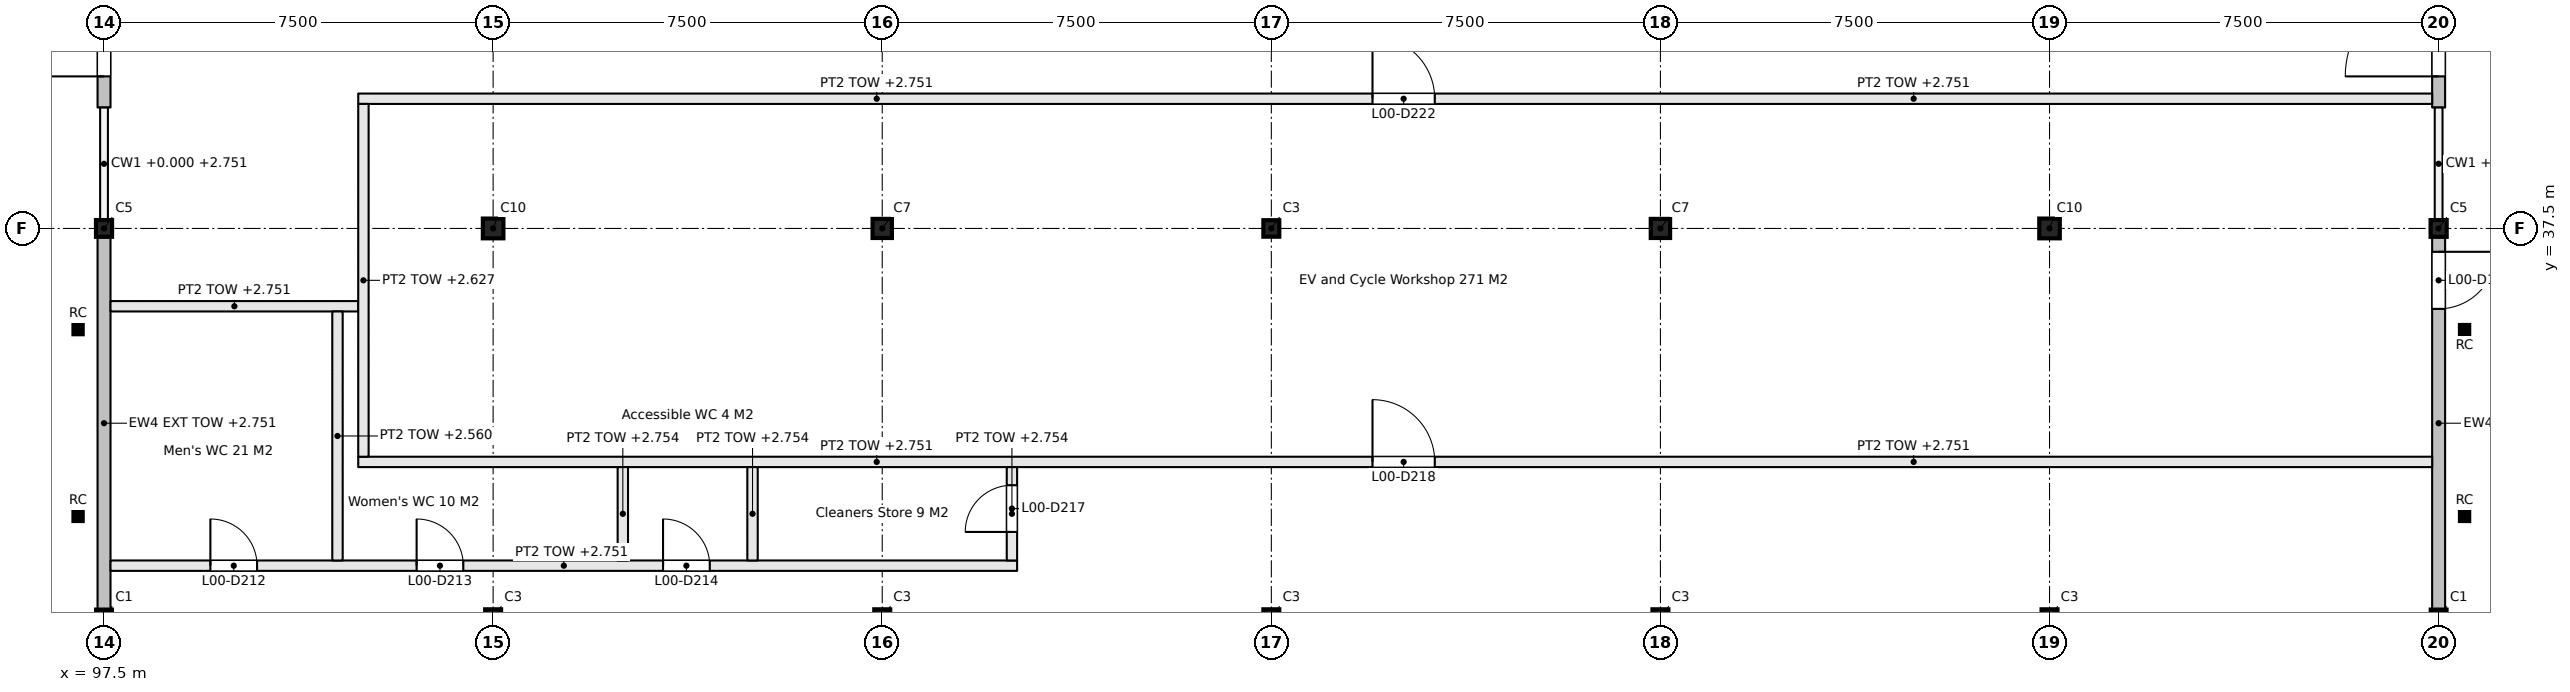
"""IFC4 building model, lengths in metres.
Left out: names, types, materials, properties, quantities, classifications, styles, units other than length and angle.
Written with IfcOpenShell. Run it as: python <this file> out.ifc"""

import sys

from ifc_helpers import new_model, si_unit, direction, frame, frame_2d, origin, origin_2d, place, context, subcontext, project, spatial, rectangle, hollow_rectangle, i_section, extrude, element, fill, save


model = new_model("IFC4")
c1 = context("Model", 3, precision=1e-05, world=origin(), true_north=direction((0.0, 1.0)))
c2 = subcontext(c1, "Body", "Model", "MODEL_VIEW")
j1 = project(units=[si_unit("LENGTHUNIT", "METRE"), si_unit("PLANEANGLEUNIT", "RADIAN")], contexts=[c1])
p1 = place(None, origin())
s1 = spatial("IfcSite", under=j1, at=p1, CompositionType="ELEMENT")
p2 = place(p1, origin())
s2 = spatial("IfcBuilding", under=s1, at=p2, CompositionType="ELEMENT")
p3 = place(p2, origin())
s3 = spatial("IfcBuildingStorey", under=s2, at=p3, CompositionType="ELEMENT", Elevation=0.0)
p4 = place(p3, frame((97.5, 30.0, -0.25), z_axis=(0.0, 0.0, 1.0), x_axis=(1.0, 0.0, 0.0)))
e1 = element("IfcColumn", 1, at=p4, inside=s3, PredefinedType="COLUMN", context=c2, shape_type="SweptSolid", body=[
    extrude(i_section(OverallWidth=0.305, OverallDepth=0.307, WebThickness=0.01, FlangeThickness=0.015, FilletRadius=0.015, at=origin_2d()), origin(), (0.0, 0.0, 1.0), 3.55),
])
p5 = place(p3, frame((97.5, 37.5, -0.25), z_axis=(0.0, 0.0, 1.0), x_axis=(1.0, 0.0, 0.0)))
e2 = element("IfcColumn", 2, at=p5, inside=s3, PredefinedType="COLUMN", context=c2, shape_type="SweptSolid", body=[
    extrude(i_section(OverallWidth=0.31, OverallDepth=0.323, WebThickness=0.014, FlangeThickness=0.023, FilletRadius=0.015, at=origin_2d()), origin(), (0.0, 0.0, 1.0), 3.55),
])
p6 = place(p3, frame((105.0, 30.0, -0.25), z_axis=(0.0, 0.0, 1.0), x_axis=(1.0, 0.0, 0.0)))
e3 = element("IfcColumn", 3, at=p6, inside=s3, PredefinedType="COLUMN", context=c2, shape_type="SweptSolid", body=[
    extrude(i_section(OverallWidth=0.307, OverallDepth=0.318, WebThickness=0.013, FlangeThickness=0.021, FilletRadius=0.015, at=origin_2d()), origin(), (0.0, 0.0, 1.0), 3.55),
])
p7 = place(p3, frame((105.0, 37.5, -0.25), z_axis=(0.0, 0.0, 1.0), x_axis=(1.0, 0.0, 0.0)))
e4 = element("IfcColumn", 4, at=p7, inside=s3, PredefinedType="COLUMN", context=c2, shape_type="SweptSolid", body=[
    extrude(i_section(OverallWidth=0.396, OverallDepth=0.381, WebThickness=0.019, FlangeThickness=0.03, FilletRadius=0.015, at=origin_2d()), origin(), (0.0, 0.0, 1.0), 3.55),
])
p8 = place(p3, frame((112.5, 30.0, -0.25), z_axis=(0.0, 0.0, 1.0), x_axis=(1.0, 0.0, 0.0)))
e5 = element("IfcColumn", 5, at=p8, inside=s3, PredefinedType="COLUMN", context=c2, shape_type="SweptSolid", body=[
    extrude(i_section(OverallWidth=0.307, OverallDepth=0.318, WebThickness=0.013, FlangeThickness=0.021, FilletRadius=0.015, at=origin_2d()), origin(), (0.0, 0.0, 1.0), 3.55),
])
p9 = place(p3, frame((112.5, 37.5, -0.25), z_axis=(0.0, 0.0, 1.0), x_axis=(1.0, 0.0, 0.0)))
e6 = element("IfcColumn", 6, at=p9, inside=s3, PredefinedType="COLUMN", context=c2, shape_type="SweptSolid", body=[
    extrude(i_section(OverallWidth=0.373, OverallDepth=0.368, WebThickness=0.015, FlangeThickness=0.024, FilletRadius=0.015, at=origin_2d()), origin(), (0.0, 0.0, 1.0), 3.55),
])
for number, where, z_axis, x_axis in (
    (7, (120.0, 30.0, -0.25), (0.0, 0.0, 1.0), (1.0, 0.0, 0.0)),
    (8, (120.0, 37.5, -0.25), (0.0, 0.0, 1.0), (1.0, 0.0, 0.0)),
    (9, (127.5, 30.0, -0.25), (0.0, 0.0, 1.0), (1.0, 0.0, 0.0)),
):
    element("IfcColumn", number, at=place(p3, frame(where, z_axis=z_axis, x_axis=x_axis)), inside=s3, PredefinedType="COLUMN", context=c2, shape_type="SweptSolid", body=[
        extrude(i_section(OverallWidth=0.307, OverallDepth=0.318, WebThickness=0.013, FlangeThickness=0.021, FilletRadius=0.015, at=origin_2d()), origin(), (0.0, 0.0, 1.0), 3.55),
    ])
p10 = place(p3, frame((127.5, 37.5, -0.25), z_axis=(0.0, 0.0, 1.0), x_axis=(1.0, 0.0, 0.0)))
e10 = element("IfcColumn", 10, at=p10, inside=s3, PredefinedType="COLUMN", context=c2, shape_type="SweptSolid", body=[
    extrude(i_section(OverallWidth=0.373, OverallDepth=0.368, WebThickness=0.015, FlangeThickness=0.024, FilletRadius=0.015, at=origin_2d()), origin(), (0.0, 0.0, 1.0), 3.55),
])
p11 = place(p3, frame((135.0, 30.0, -0.25), z_axis=(0.0, 0.0, 1.0), x_axis=(1.0, 0.0, 0.0)))
e11 = element("IfcColumn", 11, at=p11, inside=s3, PredefinedType="COLUMN", context=c2, shape_type="SweptSolid", body=[
    extrude(i_section(OverallWidth=0.307, OverallDepth=0.318, WebThickness=0.013, FlangeThickness=0.021, FilletRadius=0.015, at=origin_2d()), origin(), (0.0, 0.0, 1.0), 3.55),
])
p12 = place(p3, frame((135.0, 37.5, -0.25), z_axis=(0.0, 0.0, 1.0), x_axis=(1.0, 0.0, 0.0)))
e12 = element("IfcColumn", 12, at=p12, inside=s3, PredefinedType="COLUMN", context=c2, shape_type="SweptSolid", body=[
    extrude(i_section(OverallWidth=0.396, OverallDepth=0.381, WebThickness=0.019, FlangeThickness=0.03, FilletRadius=0.015, at=origin_2d()), origin(), (0.0, 0.0, 1.0), 3.55),
])
p13 = place(p3, frame((142.5, 30.0, -0.25), z_axis=(0.0, 0.0, 1.0), x_axis=(1.0, 0.0, 0.0)))
e13 = element("IfcColumn", 13, at=p13, inside=s3, PredefinedType="COLUMN", context=c2, shape_type="SweptSolid", body=[
    extrude(i_section(OverallWidth=0.305, OverallDepth=0.307, WebThickness=0.01, FlangeThickness=0.015, FilletRadius=0.015, at=origin_2d()), origin(), (0.0, 0.0, 1.0), 3.55),
])
p14 = place(p3, frame((142.5, 37.5, -0.25), z_axis=(0.0, 0.0, 1.0), x_axis=(1.0, 0.0, 0.0)))
e14 = element("IfcColumn", 14, at=p14, inside=s3, PredefinedType="COLUMN", context=c2, shape_type="SweptSolid", body=[
    extrude(i_section(OverallWidth=0.31, OverallDepth=0.323, WebThickness=0.014, FlangeThickness=0.023, FilletRadius=0.015, at=origin_2d()), origin(), (0.0, 0.0, 1.0), 3.55),
])
for number, where, z_axis, x_axis in (
    (15, (97.0, 31.95, -0.25), (0.0, 0.0, 1.0), (1.0, 0.0, 0.0)),
    (16, (97.0, 35.55, -0.25), (0.0, 0.0, 1.0), (1.0, 0.0, 0.0)),
    (17, (143.0, 31.95, -0.25), (0.0, 0.0, 1.0), (1.0, 0.0, 0.0)),
    (18, (143.0, 35.55, -0.25), (0.0, 0.0, 1.0), (1.0, 0.0, 0.0)),
):
    element("IfcColumn", number, at=place(p3, frame(where, z_axis=z_axis, x_axis=x_axis)), inside=s3, PredefinedType="COLUMN", context=c2, shape_type="SweptSolid", body=[
        extrude(hollow_rectangle(XDim=0.178, YDim=0.178, WallThickness=0.01, at=origin_2d()), origin(), (0.0, 0.0, 1.0), 3.55),
    ])
p15 = place(p3, frame((97.625, 31.0, 0.0), z_axis=(0.0, 0.0, 1.0), x_axis=(1.0, 0.0, 0.0)))
e19 = element("IfcWall", 19, at=p15, inside=s3, PredefinedType="PARTITIONING", context=c2, shape_type="SweptSolid", body=[
    extrude(rectangle(XDim=17.475, YDim=0.2, at=frame_2d((8.738, 0.0))), origin(), (0.0, 0.0, 1.0), 2.751),
])
p16 = place(p15, frame((1.925, 0.0, 0.0)))
e20 = element("IfcOpeningElement", 20, at=p16, cuts=e19, PredefinedType="OPENING", context=c2, shape_type="SweptSolid", body=[
    extrude(rectangle(XDim=0.9, YDim=2.1, at=frame_2d((0.45, 1.05))), frame((0.0, 0.11, 0.0), z_axis=(0.0, -1.0, 0.0), x_axis=(1.0, 0.0, 0.0)), (0.0, 0.0, 1.0), 0.22),
])
p17 = place(p15, frame((5.9, 0.0, 0.0)))
e21 = element("IfcOpeningElement", 21, at=p17, cuts=e19, PredefinedType="OPENING", context=c2, shape_type="SweptSolid", body=[
    extrude(rectangle(XDim=0.9, YDim=2.1, at=frame_2d((0.45, 1.05))), frame((0.0, 0.11, 0.0), z_axis=(0.0, -1.0, 0.0), x_axis=(1.0, 0.0, 0.0)), (0.0, 0.0, 1.0), 0.22),
])
p18 = place(p15, frame((10.65, 0.0, 0.0)))
e22 = element("IfcOpeningElement", 22, at=p18, cuts=e19, PredefinedType="OPENING", context=c2, shape_type="SweptSolid", body=[
    extrude(rectangle(XDim=0.9, YDim=2.1, at=frame_2d((0.45, 1.05))), frame((0.0, 0.11, 0.0), z_axis=(0.0, -1.0, 0.0), x_axis=(1.0, 0.0, 0.0)), (0.0, 0.0, 1.0), 0.22),
])
p19 = place(p3, frame((102.4, 33.0, 0.0), z_axis=(0.0, 0.0, 1.0), x_axis=(1.0, 0.0, 0.0)))
e23 = element("IfcWall", 23, at=p19, inside=s3, PredefinedType="PARTITIONING", context=c2, shape_type="SweptSolid", body=[
    extrude(rectangle(XDim=39.975, YDim=0.2, at=frame_2d((19.988, 0.0))), origin(), (0.0, 0.0, 1.0), 2.751),
])
p20 = place(p19, frame((19.55, 0.0, 0.0)))
e24 = element("IfcOpeningElement", 24, at=p20, cuts=e23, PredefinedType="OPENING", context=c2, shape_type="SweptSolid", body=[
    extrude(rectangle(XDim=1.2, YDim=2.1, at=frame_2d((0.6, 1.05))), frame((0.0, 0.11, 0.0), z_axis=(0.0, -1.0, 0.0), x_axis=(1.0, 0.0, 0.0)), (0.0, 0.0, 1.0), 0.22),
])
p21 = place(p3, frame((97.625, 36.0, 0.0), z_axis=(0.0, 0.0, 1.0), x_axis=(1.0, 0.0, 0.0)))
e25 = element("IfcWall", 25, at=p21, inside=s3, PredefinedType="PARTITIONING", context=c2, shape_type="SweptSolid", body=[
    extrude(rectangle(XDim=4.775, YDim=0.2, at=frame_2d((2.387, 0.0))), origin(), (0.0, 0.0, 1.0), 2.751),
])
p22 = place(p3, frame((102.4, 40.0, 0.0), z_axis=(0.0, 0.0, 1.0), x_axis=(1.0, 0.0, 0.0)))
e26 = element("IfcWall", 26, at=p22, inside=s3, PredefinedType="PARTITIONING", context=c2, shape_type="SweptSolid", body=[
    extrude(rectangle(XDim=39.975, YDim=0.2, at=frame_2d((19.988, 0.0))), origin(), (0.0, 0.0, 1.0), 2.751),
])
p23 = place(p22, frame((19.55, 0.0, 0.0)))
e27 = element("IfcOpeningElement", 27, at=p23, cuts=e26, PredefinedType="OPENING", context=c2, shape_type="SweptSolid", body=[
    extrude(rectangle(XDim=1.2, YDim=2.1, at=frame_2d((0.6, 1.05))), frame((0.0, 0.11, 0.0), z_axis=(0.0, -1.0, 0.0), x_axis=(1.0, 0.0, 0.0)), (0.0, 0.0, 1.0), 0.22),
])
p24 = place(p3, frame((102.0, 31.1, 0.0), z_axis=(0.0, 0.0, 1.0), x_axis=(0.0, 1.0, 0.0)))
e28 = element("IfcWall", 28, at=p24, inside=s3, PredefinedType="PARTITIONING", context=c2, shape_type="SweptSolid", body=[
    extrude(rectangle(XDim=4.8, YDim=0.2, at=frame_2d((2.4, 0.0))), origin(), (0.0, 0.0, 1.0), 2.56),
])
p25 = place(p3, frame((102.5, 33.1, 0.0), z_axis=(0.0, 0.0, 1.0), x_axis=(0.0, 1.0, 0.0)))
e29 = element("IfcWall", 29, at=p25, inside=s3, PredefinedType="PARTITIONING", context=c2, shape_type="SweptSolid", body=[
    extrude(rectangle(XDim=6.8, YDim=0.2, at=frame_2d((3.4, 0.0))), origin(), (0.0, 0.0, 1.0), 2.627),
])
for number, where, z_axis, x_axis in (
    (30, (107.5, 31.1, 0.0), (0.0, 0.0, 1.0), (0.0, 1.0, 0.0)),
    (31, (110.0, 31.1, 0.0), (0.0, 0.0, 1.0), (0.0, 1.0, 0.0)),
):
    element("IfcWall", number, at=place(p3, frame(where, z_axis=z_axis, x_axis=x_axis)), inside=s3, PredefinedType="PARTITIONING", context=c2, shape_type="SweptSolid", body=[
        extrude(rectangle(XDim=1.8, YDim=0.2, at=frame_2d((0.9, 0.0))), origin(), (0.0, 0.0, 1.0), 2.754),
    ])
p26 = place(p3, frame((115.0, 31.1, 0.0), z_axis=(0.0, 0.0, 1.0), x_axis=(0.0, 1.0, 0.0)))
e32 = element("IfcWall", 32, at=p26, inside=s3, PredefinedType="PARTITIONING", context=c2, shape_type="SweptSolid", body=[
    extrude(rectangle(XDim=1.8, YDim=0.2, at=frame_2d((0.9, 0.0))), origin(), (0.0, 0.0, 1.0), 2.754),
])
p27 = place(p26, frame((0.55, 0.0, 0.0)))
e33 = element("IfcOpeningElement", 33, at=p27, cuts=e32, PredefinedType="OPENING", context=c2, shape_type="SweptSolid", body=[
    extrude(rectangle(XDim=0.9, YDim=2.1, at=frame_2d((0.45, 1.05))), frame((0.0, 0.11, 0.0), z_axis=(0.0, -1.0, 0.0), x_axis=(1.0, 0.0, 0.0)), (0.0, 0.0, 1.0), 0.22),
])
p28 = place(p3, frame((97.5, 30.154, 0.0), z_axis=(0.0, 0.0, 1.0), x_axis=(0.0, 1.0, 0.0)))
e34 = element("IfcWall", 34, at=p28, inside=s3, PredefinedType="SOLIDWALL", context=c2, shape_type="SweptSolid", body=[
    extrude(rectangle(XDim=7.185, YDim=0.25, at=frame_2d((3.592, 0.0))), origin(), (0.0, 0.0, 1.0), 2.751),
])
p29 = place(p3, frame((97.5, 39.831, 0.0), z_axis=(0.0, 0.0, 1.0), x_axis=(0.0, 1.0, 0.0)))
e35 = element("IfcWall", 35, at=p29, inside=s3, PredefinedType="SOLIDWALL", context=c2, shape_type="SweptSolid", body=[
    extrude(rectangle(XDim=3.0, YDim=0.25, at=frame_2d((1.5, 0.0))), origin(), (0.0, 0.0, 1.0), 2.751),
])
p30 = place(p29, frame((0.6, 0.0, 0.0)))
e36 = element("IfcOpeningElement", 36, at=p30, cuts=e35, PredefinedType="OPENING", context=c2, shape_type="SweptSolid", body=[
    extrude(rectangle(XDim=1.8, YDim=2.4, at=frame_2d((0.9, 1.2))), frame((0.0, 0.135, 0.0), z_axis=(0.0, -1.0, 0.0), x_axis=(1.0, 0.0, 0.0)), (0.0, 0.0, 1.0), 0.27),
])
p31 = place(p3, frame((142.5, 37.338, 0.0), z_axis=(0.0, 0.0, 1.0), x_axis=(0.0, -1.0, 0.0)))
e37 = element("IfcWall", 37, at=p31, inside=s3, PredefinedType="SOLIDWALL", context=c2, shape_type="SweptSolid", body=[
    extrude(rectangle(XDim=7.185, YDim=0.25, at=frame_2d((3.592, 0.0))), origin(), (0.0, 0.0, 1.0), 2.751),
])
p32 = place(p31, frame((0.289, 0.0, 0.0)))
e38 = element("IfcOpeningElement", 38, at=p32, cuts=e37, PredefinedType="OPENING", context=c2, shape_type="SweptSolid", body=[
    extrude(rectangle(XDim=1.1, YDim=2.4, at=frame_2d((0.55, 1.2))), frame((0.0, 0.135, 0.0), z_axis=(0.0, -1.0, 0.0), x_axis=(1.0, 0.0, 0.0)), (0.0, 0.0, 1.0), 0.27),
])
p33 = place(p3, frame((142.5, 39.831, 0.0), z_axis=(0.0, 0.0, 1.0), x_axis=(0.0, 1.0, 0.0)))
e39 = element("IfcWall", 39, at=p33, inside=s3, PredefinedType="SOLIDWALL", context=c2, shape_type="SweptSolid", body=[
    extrude(rectangle(XDim=3.0, YDim=0.25, at=frame_2d((1.5, 0.0))), origin(), (0.0, 0.0, 1.0), 2.751),
])
p34 = place(p33, frame((0.6, 0.0, 0.0)))
e40 = element("IfcOpeningElement", 40, at=p34, cuts=e39, PredefinedType="OPENING", context=c2, shape_type="SweptSolid", body=[
    extrude(rectangle(XDim=1.8, YDim=2.4, at=frame_2d((0.9, 1.2))), frame((0.0, 0.135, 0.0), z_axis=(0.0, -1.0, 0.0), x_axis=(1.0, 0.0, 0.0)), (0.0, 0.0, 1.0), 0.27),
])
p35 = place(p16, origin())
e41 = element("IfcDoor", 41, at=p35, inside=s3, OperationType="SINGLE_SWING_LEFT", PredefinedType="DOOR", context=c2, shape_type="SweptSolid", body=[
    extrude(rectangle(XDim=0.9, YDim=2.1, at=frame_2d((0.45, 1.05))), frame((0.0, 0.025, 0.0), z_axis=(0.0, -1.0, 0.0), x_axis=(1.0, 0.0, 0.0)), (0.0, 0.0, 1.0), 0.05),
])
fill(e20, e41)
p36 = place(p17, origin())
e42 = element("IfcDoor", 42, at=p36, inside=s3, OperationType="SINGLE_SWING_LEFT", PredefinedType="DOOR", context=c2, shape_type="SweptSolid", body=[
    extrude(rectangle(XDim=0.9, YDim=2.1, at=frame_2d((0.45, 1.05))), frame((0.0, 0.025, 0.0), z_axis=(0.0, -1.0, 0.0), x_axis=(1.0, 0.0, 0.0)), (0.0, 0.0, 1.0), 0.05),
])
fill(e21, e42)
p37 = place(p18, origin())
e43 = element("IfcDoor", 43, at=p37, inside=s3, OperationType="SINGLE_SWING_RIGHT", PredefinedType="DOOR", context=c2, shape_type="SweptSolid", body=[
    extrude(rectangle(XDim=0.9, YDim=2.1, at=frame_2d((0.45, 1.05))), frame((0.0, 0.025, 0.0), z_axis=(0.0, -1.0, 0.0), x_axis=(1.0, 0.0, 0.0)), (0.0, 0.0, 1.0), 0.05),
])
fill(e22, e43)
p38 = place(p27, origin())
e44 = element("IfcDoor", 44, at=p38, inside=s3, OperationType="SINGLE_SWING_RIGHT", PredefinedType="DOOR", context=c2, shape_type="SweptSolid", body=[
    extrude(rectangle(XDim=0.9, YDim=2.1, at=frame_2d((0.45, 1.05))), frame((0.0, 0.025, 0.0), z_axis=(0.0, -1.0, 0.0), x_axis=(1.0, 0.0, 0.0)), (0.0, 0.0, 1.0), 0.05),
])
fill(e33, e44)
p39 = place(p20, origin())
e45 = element("IfcDoor", 45, at=p39, inside=s3, OperationType="DOUBLE_DOOR_SINGLE_SWING", PredefinedType="DOOR", context=c2, shape_type="SweptSolid", body=[
    extrude(rectangle(XDim=1.2, YDim=2.1, at=frame_2d((0.6, 1.05))), frame((0.0, 0.025, 0.0), z_axis=(0.0, -1.0, 0.0), x_axis=(1.0, 0.0, 0.0)), (0.0, 0.0, 1.0), 0.05),
])
fill(e24, e45)
p40 = place(p23, origin())
e46 = element("IfcDoor", 46, at=p40, inside=s3, OperationType="DOUBLE_DOOR_SINGLE_SWING", PredefinedType="DOOR", context=c2, shape_type="SweptSolid", body=[
    extrude(rectangle(XDim=1.2, YDim=2.1, at=frame_2d((0.6, 1.05))), frame((0.0, 0.025, 0.0), z_axis=(0.0, -1.0, 0.0), x_axis=(1.0, 0.0, 0.0)), (0.0, 0.0, 1.0), 0.05),
])
fill(e27, e46)
p41 = place(p30, origin())
e47 = element("IfcDoor", 47, at=p41, inside=s3, OperationType="DOUBLE_DOOR_SINGLE_SWING", PredefinedType="DOOR", context=c2, shape_type="SweptSolid", body=[
    extrude(rectangle(XDim=1.8, YDim=2.4, at=frame_2d((0.9, 1.2))), frame((0.0, 0.025, 0.0), z_axis=(0.0, -1.0, 0.0), x_axis=(1.0, 0.0, 0.0)), (0.0, 0.0, 1.0), 0.05),
])
fill(e36, e47)
p42 = place(p32, origin())
e48 = element("IfcDoor", 48, at=p42, inside=s3, OperationType="SINGLE_SWING_RIGHT", PredefinedType="DOOR", context=c2, shape_type="SweptSolid", body=[
    extrude(rectangle(XDim=1.1, YDim=2.4, at=frame_2d((0.55, 1.2))), frame((0.0, 0.025, 0.0), z_axis=(0.0, -1.0, 0.0), x_axis=(1.0, 0.0, 0.0)), (0.0, 0.0, 1.0), 0.05),
])
fill(e38, e48)
p43 = place(p34, origin())
e49 = element("IfcDoor", 49, at=p43, inside=s3, OperationType="DOUBLE_DOOR_SINGLE_SWING", PredefinedType="DOOR", context=c2, shape_type="SweptSolid", body=[
    extrude(rectangle(XDim=1.8, YDim=2.4, at=frame_2d((0.9, 1.2))), frame((0.0, 0.025, 0.0), z_axis=(0.0, -1.0, 0.0), x_axis=(1.0, 0.0, 0.0)), (0.0, 0.0, 1.0), 0.05),
])
fill(e40, e49)
save(model, sys.argv[1])
